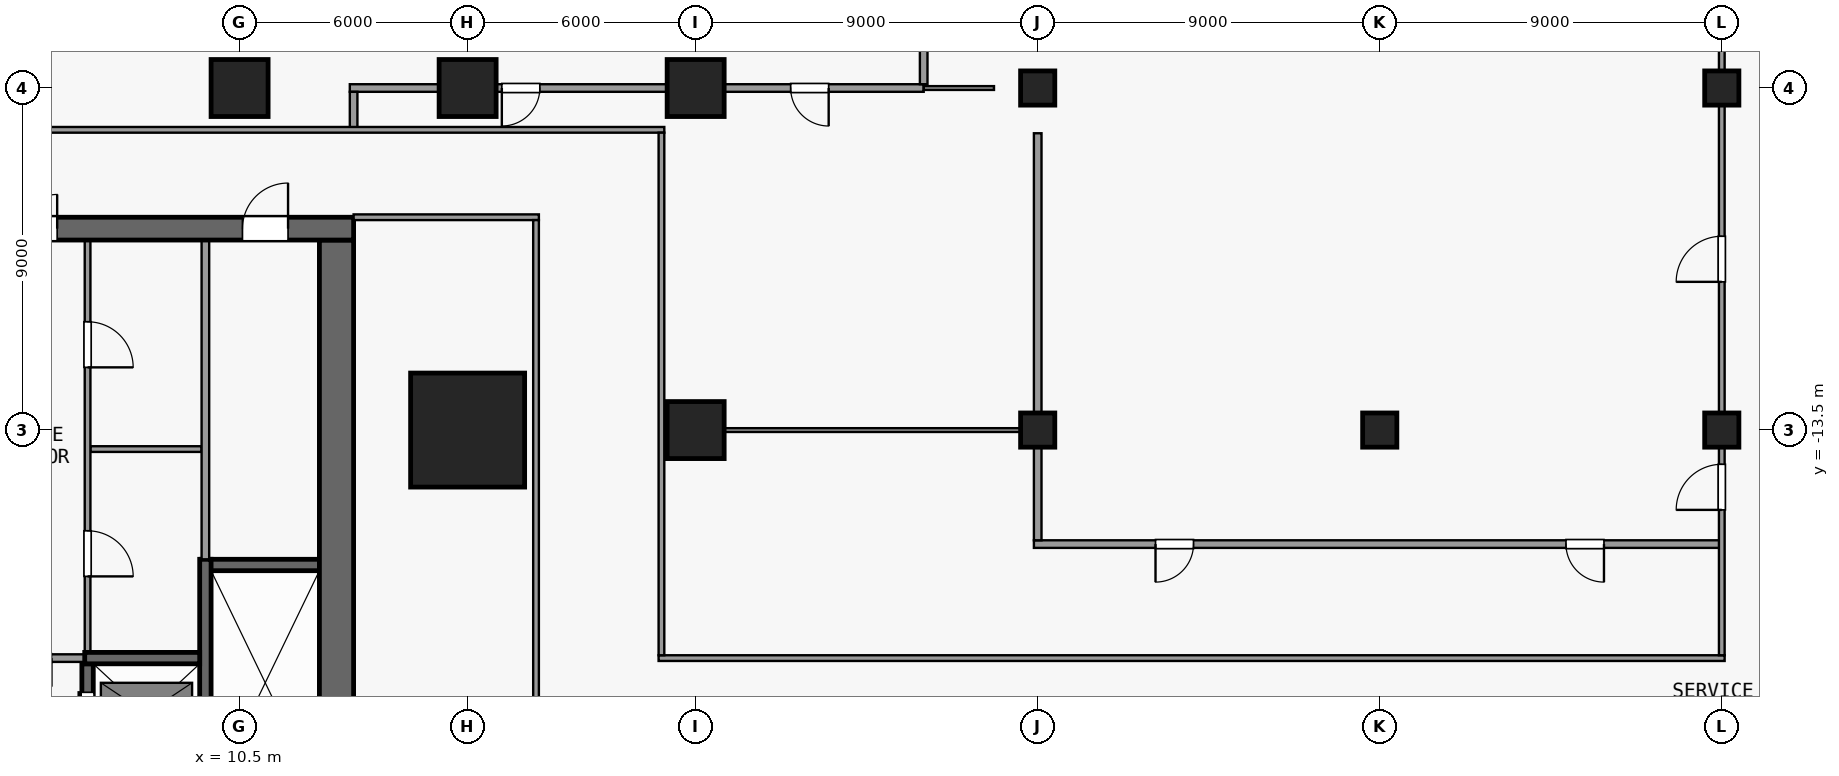
"""IFC4 building model, lengths in metres.
Left out: names, types, materials, properties, quantities, classifications, styles, units other than length and angle.
Written with IfcOpenShell. Run it as: python <this file> out.ifc"""

import sys

from ifc_helpers import new_model, si_unit, direction, frame, frame_2d, origin, origin_2d, place, context, subcontext, project, spatial, rectangle, extrude, element, fill, save


model = new_model("IFC4")
c1 = context("Model", 3, precision=1e-05, world=origin(), true_north=direction((0.0, 1.0)))
c2 = subcontext(c1, "Body", "Model", "MODEL_VIEW")
j1 = project(units=[si_unit("LENGTHUNIT", "METRE"), si_unit("PLANEANGLEUNIT", "RADIAN")], contexts=[c1])
p1 = place(None, origin())
s1 = spatial("IfcSite", under=j1, at=p1, CompositionType="ELEMENT")
p2 = place(p1, origin())
s2 = spatial("IfcBuilding", under=s1, at=p2, CompositionType="ELEMENT")
p3 = place(p2, origin())
s3 = spatial("IfcBuildingStorey", under=s2, at=p3, CompositionType="ELEMENT", Elevation=0.0)
p4 = place(p3, frame((10.5, -4.5, 0.0), z_axis=(0.0, 0.0, 1.0), x_axis=(1.0, 0.0, 0.0)))
e1 = element("IfcColumn", 1, at=p4, inside=s3, PredefinedType="COLUMN", context=c2, shape_type="SweptSolid", body=[
    extrude(rectangle(XDim=1.5, YDim=1.5, at=origin_2d()), origin(), (0.0, 0.0, 1.0), 8.0),
])
p5 = place(p3, frame((16.5, -13.5, 0.0), z_axis=(0.0, 0.0, 1.0), x_axis=(1.0, 0.0, 0.0)))
e2 = element("IfcColumn", 2, at=p5, inside=s3, PredefinedType="COLUMN", context=c2, shape_type="SweptSolid", body=[
    extrude(rectangle(XDim=3.0, YDim=3.0, at=origin_2d()), origin(), (0.0, 0.0, 1.0), 8.0),
])
for number, where, z_axis, x_axis in (
    (3, (16.5, -4.5, 0.0), (0.0, 0.0, 1.0), (1.0, 0.0, 0.0)),
    (4, (22.5, -13.5, 0.0), (0.0, 0.0, 1.0), (1.0, 0.0, 0.0)),
    (5, (22.5, -4.5, 0.0), (0.0, 0.0, 1.0), (1.0, 0.0, 0.0)),
):
    element("IfcColumn", number, at=place(p3, frame(where, z_axis=z_axis, x_axis=x_axis)), inside=s3, PredefinedType="COLUMN", context=c2, shape_type="SweptSolid", body=[
        extrude(rectangle(XDim=1.5, YDim=1.5, at=origin_2d()), origin(), (0.0, 0.0, 1.0), 8.0),
    ])
for number, where, z_axis, x_axis in (
    (6, (31.5, -13.5, 0.0), (0.0, 0.0, 1.0), (1.0, 0.0, 0.0)),
    (7, (31.5, -4.5, 0.0), (0.0, 0.0, 1.0), (1.0, 0.0, 0.0)),
    (8, (40.5, -13.5, 0.0), (0.0, 0.0, 1.0), (1.0, 0.0, 0.0)),
    (9, (49.5, -13.5, 0.0), (0.0, 0.0, 1.0), (1.0, 0.0, 0.0)),
    (10, (49.5, -4.5, 0.0), (0.0, 0.0, 1.0), (1.0, 0.0, 0.0)),
):
    element("IfcColumn", number, at=place(p3, frame(where, z_axis=z_axis, x_axis=x_axis)), inside=s3, PredefinedType="COLUMN", context=c2, shape_type="SweptSolid", body=[
        extrude(rectangle(XDim=0.9, YDim=0.9, at=origin_2d()), origin(), (0.0, 0.0, 1.0), 8.0),
    ])
p6 = place(p3, frame((-13.5, -8.2, 0.0), z_axis=(0.0, 0.0, 1.0), x_axis=(1.0, 0.0, 0.0)))
e11 = element("IfcWall", 11, at=p6, inside=s3, PredefinedType="SHEAR", context=c2, shape_type="SweptSolid", body=[
    extrude(rectangle(XDim=27.0, YDim=0.6, at=frame_2d((13.5, 0.0))), origin(), (0.0, 0.0, 1.0), 7.65),
])
p7 = place(p6, frame((7.8, 0.0, 0.0)))
e12 = element("IfcOpeningElement", 12, at=p7, cuts=e11, PredefinedType="OPENING", context=c2, shape_type="SweptSolid", body=[
    extrude(rectangle(XDim=1.8, YDim=2.1, at=frame_2d((0.9, 1.05))), frame((0.0, 0.31, 0.0), z_axis=(0.0, -1.0, 0.0), x_axis=(1.0, 0.0, 0.0)), (0.0, 0.0, 1.0), 0.62),
])
p8 = place(p6, frame((17.4, 0.0, 0.0)))
e13 = element("IfcOpeningElement", 13, at=p8, cuts=e11, PredefinedType="OPENING", context=c2, shape_type="SweptSolid", body=[
    extrude(rectangle(XDim=1.8, YDim=2.1, at=frame_2d((0.9, 1.05))), frame((0.0, 0.31, 0.0), z_axis=(0.0, -1.0, 0.0), x_axis=(1.0, 0.0, 0.0)), (0.0, 0.0, 1.0), 0.62),
])
p9 = place(p6, frame((2.725, 0.0, 0.0)))
e14 = element("IfcOpeningElement", 14, at=p9, cuts=e11, PredefinedType="OPENING", context=c2, shape_type="SweptSolid", body=[
    extrude(rectangle(XDim=0.9, YDim=2.1, at=frame_2d((0.45, 1.05))), frame((0.0, 0.31, 0.0), z_axis=(0.0, -1.0, 0.0), x_axis=(1.0, 0.0, 0.0)), (0.0, 0.0, 1.0), 0.62),
])
p10 = place(p6, frame((24.075, 0.0, 0.0)))
e15 = element("IfcOpeningElement", 15, at=p10, cuts=e11, PredefinedType="OPENING", context=c2, shape_type="SweptSolid", body=[
    extrude(rectangle(XDim=1.2, YDim=2.1, at=frame_2d((0.6, 1.05))), frame((0.0, 0.31, 0.0), z_axis=(0.0, -1.0, 0.0), x_axis=(1.0, 0.0, 0.0)), (0.0, 0.0, 1.0), 0.62),
])
p11 = place(p3, frame((13.05, -24.6, 0.0), z_axis=(0.0, 0.0, 1.0), x_axis=(0.0, 1.0, 0.0)))
e16 = element("IfcWall", 16, at=p11, inside=s3, PredefinedType="SHEAR", context=c2, shape_type="SweptSolid", body=[
    extrude(rectangle(XDim=16.1, YDim=0.9, at=frame_2d((8.05, 0.0))), origin(), (0.0, 0.0, 1.0), 7.65),
])
p12 = place(p3, frame((6.575, -19.5, 0.0), z_axis=(0.0, 0.0, 1.0), x_axis=(-1.0, 0.0, 0.0)))
e17 = element("IfcWall", 17, at=p12, inside=s3, PredefinedType="PARTITIONING", context=c2, shape_type="SweptSolid", body=[
    extrude(rectangle(XDim=3.55, YDim=0.2, at=frame_2d((1.775, 0.0))), origin(), (0.0, 0.0, 1.0), 7.65),
])
p13 = place(p12, frame((1.025, 0.0, 0.0)))
e18 = element("IfcOpeningElement", 18, at=p13, cuts=e17, PredefinedType="OPENING", context=c2, shape_type="SweptSolid", body=[
    extrude(rectangle(XDim=1.5, YDim=2.1, at=frame_2d((0.75, 1.05))), frame((0.0, 0.11, 0.0), z_axis=(0.0, -1.0, 0.0), x_axis=(1.0, 0.0, 0.0)), (0.0, 0.0, 1.0), 0.22),
])
p14 = place(p3, frame((6.425, -19.5, 0.0), z_axis=(0.0, 0.0, 1.0), x_axis=(1.0, 0.0, 0.0)))
e19 = element("IfcWall", 19, at=p14, inside=s3, PredefinedType="SHEAR", context=c2, shape_type="SweptSolid", body=[
    extrude(rectangle(XDim=3.025, YDim=0.3, at=frame_2d((1.512, 0.0))), origin(), (0.0, 0.0, 1.0), 7.65),
])
p15 = place(p3, frame((9.5, -17.05, 0.0), z_axis=(0.0, 0.0, 1.0), x_axis=(1.0, 0.0, 0.0)))
e20 = element("IfcWall", 20, at=p15, inside=s3, PredefinedType="SHEAR", context=c2, shape_type="SweptSolid", body=[
    extrude(rectangle(XDim=3.1, YDim=0.3, at=frame_2d((1.55, 0.0))), origin(), (0.0, 0.0, 1.0), 7.65),
])
p16 = place(p3, frame((6.575, -14.0, 0.0), z_axis=(0.0, 0.0, 1.0), x_axis=(1.0, 0.0, 0.0)))
e21 = element("IfcWall", 21, at=p16, inside=s3, PredefinedType="PARTITIONING", context=c2, shape_type="SweptSolid", body=[
    extrude(rectangle(XDim=2.925, YDim=0.15, at=frame_2d((1.462, 0.0))), origin(), (0.0, 0.0, 1.0), 7.65),
])
p17 = place(p3, frame((6.5, -22.25, 0.0), z_axis=(0.0, 0.0, 1.0), x_axis=(0.0, 1.0, 0.0)))
e22 = element("IfcWall", 22, at=p17, inside=s3, PredefinedType="SHEAR", context=c2, shape_type="SweptSolid", body=[
    extrude(rectangle(XDim=2.6, YDim=0.3, at=frame_2d((1.3, 0.0))), origin(), (0.0, 0.0, 1.0), 7.65),
])
p18 = place(p17, frame((0.75, 0.0, 0.0)))
e23 = element("IfcOpeningElement", 23, at=p18, cuts=e22, PredefinedType="OPENING", context=c2, shape_type="SweptSolid", body=[
    extrude(rectangle(XDim=1.1, YDim=2.1, at=frame_2d((0.55, 1.05))), frame((0.0, 0.16, 0.0), z_axis=(0.0, -1.0, 0.0), x_axis=(1.0, 0.0, 0.0)), (0.0, 0.0, 1.0), 0.32),
])
p19 = place(p3, frame((6.5, -8.5, 0.0), z_axis=(0.0, 0.0, 1.0), x_axis=(0.0, -1.0, 0.0)))
e24 = element("IfcWall", 24, at=p19, inside=s3, PredefinedType="PARTITIONING", context=c2, shape_type="SweptSolid", body=[
    extrude(rectangle(XDim=10.85, YDim=0.15, at=frame_2d((5.425, 0.0))), origin(), (0.0, 0.0, 1.0), 7.65),
])
p20 = place(p19, frame((7.65, 0.0, 0.0)))
e25 = element("IfcOpeningElement", 25, at=p20, cuts=e24, PredefinedType="OPENING", context=c2, shape_type="SweptSolid", body=[
    extrude(rectangle(XDim=1.2, YDim=2.1, at=frame_2d((0.6, 1.05))), frame((0.0, 0.085, 0.0), z_axis=(0.0, -1.0, 0.0), x_axis=(1.0, 0.0, 0.0)), (0.0, 0.0, 1.0), 0.17),
])
p21 = place(p19, frame((2.15, 0.0, 0.0)))
e26 = element("IfcOpeningElement", 26, at=p21, cuts=e24, PredefinedType="OPENING", context=c2, shape_type="SweptSolid", body=[
    extrude(rectangle(XDim=1.2, YDim=2.1, at=frame_2d((0.6, 1.05))), frame((0.0, 0.085, 0.0), z_axis=(0.0, -1.0, 0.0), x_axis=(1.0, 0.0, 0.0)), (0.0, 0.0, 1.0), 0.17),
])
p22 = place(p3, frame((9.6, -16.9, 0.0), z_axis=(0.0, 0.0, 1.0), x_axis=(0.0, -1.0, 0.0)))
e27 = element("IfcWall", 27, at=p22, inside=s3, PredefinedType="SHEAR", context=c2, shape_type="SweptSolid", body=[
    extrude(rectangle(XDim=7.7, YDim=0.3, at=frame_2d((3.85, 0.0))), origin(), (0.0, 0.0, 1.0), 7.65),
])
p23 = place(p22, frame((6.5, 0.0, 0.0)))
e28 = element("IfcOpeningElement", 28, at=p23, cuts=e27, PredefinedType="OPENING", context=c2, shape_type="SweptSolid", body=[
    extrude(rectangle(XDim=1.1, YDim=2.1, at=frame_2d((0.55, 1.05))), frame((0.0, 0.16, 0.0), z_axis=(0.0, -1.0, 0.0), x_axis=(1.0, 0.0, 0.0)), (0.0, 0.0, 1.0), 0.32),
])
p24 = place(p3, frame((9.6, -16.9, 0.0), z_axis=(0.0, 0.0, 1.0), x_axis=(0.0, 1.0, 0.0)))
e29 = element("IfcWall", 29, at=p24, inside=s3, PredefinedType="PARTITIONING", context=c2, shape_type="SweptSolid", body=[
    extrude(rectangle(XDim=8.4, YDim=0.2, at=frame_2d((4.2, 0.0))), origin(), (0.0, 0.0, 1.0), 7.65),
])
p25 = place(p3, frame((21.525, -19.5, 0.0), z_axis=(0.0, 0.0, 1.0), x_axis=(1.0, 0.0, 0.0)))
e30 = element("IfcWall", 30, at=p25, inside=s3, PredefinedType="PARTITIONING", context=c2, shape_type="SweptSolid", body=[
    extrude(rectangle(XDim=28.05, YDim=0.15, at=frame_2d((14.025, 0.0))), origin(), (0.0, 0.0, 1.0), 7.65),
])
p26 = place(p3, frame((13.5, -7.9, 0.0), z_axis=(0.0, 0.0, 1.0), x_axis=(1.0, 0.0, 0.0)))
e31 = element("IfcWall", 31, at=p26, inside=s3, PredefinedType="PARTITIONING", context=c2, shape_type="SweptSolid", body=[
    extrude(rectangle(XDim=4.875, YDim=0.15, at=frame_2d((2.438, 0.0))), origin(), (0.0, 0.0, 1.0), 7.65),
])
p27 = place(p3, frame((3.825, -5.6, 0.0), z_axis=(0.0, 0.0, 1.0), x_axis=(1.0, 0.0, 0.0)))
e32 = element("IfcWall", 32, at=p27, inside=s3, PredefinedType="PARTITIONING", context=c2, shape_type="SweptSolid", body=[
    extrude(rectangle(XDim=17.85, YDim=0.15, at=frame_2d((8.925, 0.0))), origin(), (0.0, 0.0, 1.0), 7.65),
])
p28 = place(p3, frame((18.3, -22.425, 0.0), z_axis=(0.0, 0.0, 1.0), x_axis=(0.0, 1.0, 0.0)))
e33 = element("IfcWall", 33, at=p28, inside=s3, PredefinedType="PARTITIONING", context=c2, shape_type="SweptSolid", body=[
    extrude(rectangle(XDim=14.45, YDim=0.15, at=frame_2d((7.225, 0.0))), origin(), (0.0, 0.0, 1.0), 7.65),
])
p29 = place(p3, frame((21.6, -19.425, 0.0), z_axis=(0.0, 0.0, 1.0), x_axis=(0.0, 1.0, 0.0)))
e34 = element("IfcWall", 34, at=p29, inside=s3, PredefinedType="PARTITIONING", context=c2, shape_type="SweptSolid", body=[
    extrude(rectangle(XDim=13.75, YDim=0.15, at=frame_2d((6.875, 0.0))), origin(), (0.0, 0.0, 1.0), 7.65),
])
p30 = place(p3, frame((49.5, -19.425, 0.0), z_axis=(0.0, 0.0, 1.0), x_axis=(0.0, 1.0, 0.0)))
e35 = element("IfcWall", 35, at=p30, inside=s3, PredefinedType="PARTITIONING", context=c2, shape_type="SweptSolid", body=[
    extrude(rectangle(XDim=5.475, YDim=0.15, at=frame_2d((2.738, 0.0))), origin(), (0.0, 0.0, 1.0), 7.65),
])
p31 = place(p30, frame((3.825, 0.0, 0.0)))
e36 = element("IfcOpeningElement", 36, at=p31, cuts=e35, PredefinedType="OPENING", context=c2, shape_type="SweptSolid", body=[
    extrude(rectangle(XDim=1.2, YDim=2.1, at=frame_2d((0.6, 1.05))), frame((0.0, 0.085, 0.0), z_axis=(0.0, -1.0, 0.0), x_axis=(1.0, 0.0, 0.0)), (0.0, 0.0, 1.0), 0.17),
])
p32 = place(p3, frame((49.5, -13.05, 0.0), z_axis=(0.0, 0.0, 1.0), x_axis=(0.0, 1.0, 0.0)))
e37 = element("IfcWall", 37, at=p32, inside=s3, PredefinedType="PARTITIONING", context=c2, shape_type="SweptSolid", body=[
    extrude(rectangle(XDim=8.1, YDim=0.15, at=frame_2d((4.05, 0.0))), origin(), (0.0, 0.0, 1.0), 7.65),
])
p33 = place(p32, frame((3.45, 0.0, 0.0)))
e38 = element("IfcOpeningElement", 38, at=p33, cuts=e37, PredefinedType="OPENING", context=c2, shape_type="SweptSolid", body=[
    extrude(rectangle(XDim=1.2, YDim=2.1, at=frame_2d((0.6, 1.05))), frame((0.0, 0.085, 0.0), z_axis=(0.0, -1.0, 0.0), x_axis=(1.0, 0.0, 0.0)), (0.0, 0.0, 1.0), 0.17),
])
p34 = place(p3, frame((49.5, -4.05, 0.0), z_axis=(0.0, 0.0, 1.0), x_axis=(0.0, 1.0, 0.0)))
e39 = element("IfcWall", 39, at=p34, inside=s3, PredefinedType="PARTITIONING", context=c2, shape_type="SweptSolid", body=[
    extrude(rectangle(XDim=5.1, YDim=0.15, at=frame_2d((2.55, 0.0))), origin(), (0.0, 0.0, 1.0), 7.65),
])
p35 = place(p3, frame((31.4, -16.5, 0.0), z_axis=(0.0, 0.0, 1.0), x_axis=(1.0, 0.0, 0.0)))
e40 = element("IfcWall", 40, at=p35, inside=s3, PredefinedType="PARTITIONING", context=c2, shape_type="SweptSolid", body=[
    extrude(rectangle(XDim=18.1, YDim=0.2, at=frame_2d((9.05, 0.0))), origin(), (0.0, 0.0, 1.0), 7.65),
])
p36 = place(p35, frame((3.2, 0.0, 0.0)))
e41 = element("IfcOpeningElement", 41, at=p36, cuts=e40, PredefinedType="OPENING", context=c2, shape_type="SweptSolid", body=[
    extrude(rectangle(XDim=1.0, YDim=2.1, at=frame_2d((0.5, 1.05))), frame((0.0, 0.11, 0.0), z_axis=(0.0, -1.0, 0.0), x_axis=(1.0, 0.0, 0.0)), (0.0, 0.0, 1.0), 0.22),
])
p37 = place(p35, frame((14.0, 0.0, 0.0)))
e42 = element("IfcOpeningElement", 42, at=p37, cuts=e40, PredefinedType="OPENING", context=c2, shape_type="SweptSolid", body=[
    extrude(rectangle(XDim=1.0, YDim=2.1, at=frame_2d((0.5, 1.05))), frame((0.0, 0.11, 0.0), z_axis=(0.0, -1.0, 0.0), x_axis=(1.0, 0.0, 0.0)), (0.0, 0.0, 1.0), 0.22),
])
p38 = place(p3, frame((21.6, -13.5, 0.0), z_axis=(0.0, 0.0, 1.0), x_axis=(1.0, 0.0, 0.0)))
e43 = element("IfcWall", 43, at=p38, inside=s3, PredefinedType="PARTITIONING", context=c2, shape_type="SweptSolid", body=[
    extrude(rectangle(XDim=9.8, YDim=0.1, at=frame_2d((4.9, 0.0))), origin(), (0.0, 0.0, 1.0), 7.65),
])
p39 = place(p3, frame((13.4, -4.5, 0.0), z_axis=(0.0, 0.0, 1.0), x_axis=(1.0, 0.0, 0.0)))
e44 = element("IfcWall", 44, at=p39, inside=s3, PredefinedType="PARTITIONING", context=c2, shape_type="SweptSolid", body=[
    extrude(rectangle(XDim=15.1, YDim=0.2, at=frame_2d((7.55, 0.0))), origin(), (0.0, 0.0, 1.0), 7.65),
])
p40 = place(p39, frame((4.0, 0.0, 0.0)))
e45 = element("IfcOpeningElement", 45, at=p40, cuts=e44, PredefinedType="OPENING", context=c2, shape_type="SweptSolid", body=[
    extrude(rectangle(XDim=1.0, YDim=2.1, at=frame_2d((0.5, 1.05))), frame((0.0, 0.11, 0.0), z_axis=(0.0, -1.0, 0.0), x_axis=(1.0, 0.0, 0.0)), (0.0, 0.0, 1.0), 0.22),
])
p41 = place(p39, frame((11.6, 0.0, 0.0)))
e46 = element("IfcOpeningElement", 46, at=p41, cuts=e44, PredefinedType="OPENING", context=c2, shape_type="SweptSolid", body=[
    extrude(rectangle(XDim=1.0, YDim=2.1, at=frame_2d((0.5, 1.05))), frame((0.0, 0.11, 0.0), z_axis=(0.0, -1.0, 0.0), x_axis=(1.0, 0.0, 0.0)), (0.0, 0.0, 1.0), 0.22),
])
p42 = place(p3, frame((28.5, -4.5, 0.0), z_axis=(0.0, 0.0, 1.0), x_axis=(1.0, 0.0, 0.0)))
e47 = element("IfcWall", 47, at=p42, inside=s3, PredefinedType="PARTITIONING", context=c2, shape_type="SweptSolid", body=[
    extrude(rectangle(XDim=1.85, YDim=0.1, at=frame_2d((0.925, 0.0))), origin(), (0.0, 0.0, 1.0), 7.65),
])
p43 = place(p3, frame((13.5, -5.6, 0.0), z_axis=(0.0, 0.0, 1.0), x_axis=(0.0, 1.0, 0.0)))
e48 = element("IfcWall", 48, at=p43, inside=s3, PredefinedType="PARTITIONING", context=c2, shape_type="SweptSolid", body=[
    extrude(rectangle(XDim=1.0, YDim=0.2, at=frame_2d((0.5, 0.0))), origin(), (0.0, 0.0, 1.0), 7.65),
])
p44 = place(p3, frame((28.5, -4.4, 0.0), z_axis=(0.0, 0.0, 1.0), x_axis=(0.0, 1.0, 0.0)))
e49 = element("IfcWall", 49, at=p44, inside=s3, PredefinedType="PARTITIONING", context=c2, shape_type="SweptSolid", body=[
    extrude(rectangle(XDim=5.8, YDim=0.2, at=frame_2d((2.9, 0.0))), origin(), (0.0, 0.0, 1.0), 7.65),
])
p45 = place(p44, frame((2.4, 0.0, 0.0)))
e50 = element("IfcOpeningElement", 50, at=p45, cuts=e49, PredefinedType="OPENING", context=c2, shape_type="SweptSolid", body=[
    extrude(rectangle(XDim=1.0, YDim=2.1, at=frame_2d((0.5, 1.05))), frame((0.0, 0.11, 0.0), z_axis=(0.0, -1.0, 0.0), x_axis=(1.0, 0.0, 0.0)), (0.0, 0.0, 1.0), 0.22),
])
p46 = place(p3, frame((31.5, -16.4, 0.0), z_axis=(0.0, 0.0, 1.0), x_axis=(0.0, 1.0, 0.0)))
e51 = element("IfcWall", 51, at=p46, inside=s3, PredefinedType="PARTITIONING", context=c2, shape_type="SweptSolid", body=[
    extrude(rectangle(XDim=10.71, YDim=0.2, at=frame_2d((5.355, 0.0))), origin(), (0.0, 0.0, 1.0), 7.65),
])
p47 = place(p18, origin())
e52 = element("IfcDoor", 52, at=p47, inside=s3, OperationType="DOUBLE_DOOR_SLIDING", PredefinedType="DOOR", context=c2, shape_type="SweptSolid", body=[
    extrude(rectangle(XDim=1.1, YDim=2.1, at=frame_2d((0.55, 1.05))), frame((0.0, 0.025, 0.0), z_axis=(0.0, -1.0, 0.0), x_axis=(1.0, 0.0, 0.0)), (0.0, 0.0, 1.0), 0.05),
])
fill(e23, e52)
p48 = place(p8, origin())
e53 = element("IfcDoor", 53, at=p48, inside=s3, OperationType="DOUBLE_DOOR_SINGLE_SWING", PredefinedType="DOOR", context=c2, shape_type="SweptSolid", body=[
    extrude(rectangle(XDim=1.8, YDim=2.1, at=frame_2d((0.9, 1.05))), frame((0.0, 0.025, 0.0), z_axis=(0.0, -1.0, 0.0), x_axis=(1.0, 0.0, 0.0)), (0.0, 0.0, 1.0), 0.05),
])
fill(e13, e53)
p49 = place(p10, origin())
e54 = element("IfcDoor", 54, at=p49, inside=s3, OperationType="SINGLE_SWING_RIGHT", PredefinedType="DOOR", context=c2, shape_type="SweptSolid", body=[
    extrude(rectangle(XDim=1.2, YDim=2.1, at=frame_2d((0.6, 1.05))), frame((0.0, 0.025, 0.0), z_axis=(0.0, -1.0, 0.0), x_axis=(1.0, 0.0, 0.0)), (0.0, 0.0, 1.0), 0.05),
])
fill(e15, e54)
p50 = place(p20, origin())
e55 = element("IfcDoor", 55, at=p50, inside=s3, OperationType="SINGLE_SWING_RIGHT", PredefinedType="DOOR", context=c2, shape_type="SweptSolid", body=[
    extrude(rectangle(XDim=1.2, YDim=2.1, at=frame_2d((0.6, 1.05))), frame((0.0, 0.025, 0.0), z_axis=(0.0, -1.0, 0.0), x_axis=(1.0, 0.0, 0.0)), (0.0, 0.0, 1.0), 0.05),
])
fill(e25, e55)
p51 = place(p21, origin())
e56 = element("IfcDoor", 56, at=p51, inside=s3, OperationType="SINGLE_SWING_RIGHT", PredefinedType="DOOR", context=c2, shape_type="SweptSolid", body=[
    extrude(rectangle(XDim=1.2, YDim=2.1, at=frame_2d((0.6, 1.05))), frame((0.0, 0.025, 0.0), z_axis=(0.0, -1.0, 0.0), x_axis=(1.0, 0.0, 0.0)), (0.0, 0.0, 1.0), 0.05),
])
fill(e26, e56)
p52 = place(p31, origin())
e57 = element("IfcDoor", 57, at=p52, inside=s3, OperationType="SINGLE_SWING_LEFT", PredefinedType="DOOR", context=c2, shape_type="SweptSolid", body=[
    extrude(rectangle(XDim=1.2, YDim=2.1, at=frame_2d((0.6, 1.05))), frame((0.0, 0.025, 0.0), z_axis=(0.0, -1.0, 0.0), x_axis=(1.0, 0.0, 0.0)), (0.0, 0.0, 1.0), 0.05),
])
fill(e36, e57)
p53 = place(p33, origin())
e58 = element("IfcDoor", 58, at=p53, inside=s3, OperationType="SINGLE_SWING_LEFT", PredefinedType="DOOR", context=c2, shape_type="SweptSolid", body=[
    extrude(rectangle(XDim=1.2, YDim=2.1, at=frame_2d((0.6, 1.05))), frame((0.0, 0.025, 0.0), z_axis=(0.0, -1.0, 0.0), x_axis=(1.0, 0.0, 0.0)), (0.0, 0.0, 1.0), 0.05),
])
fill(e38, e58)
p54 = place(p36, origin())
e59 = element("IfcDoor", 59, at=p54, inside=s3, OperationType="SINGLE_SWING_LEFT", PredefinedType="DOOR", context=c2, shape_type="SweptSolid", body=[
    extrude(rectangle(XDim=1.0, YDim=2.1, at=frame_2d((0.5, 1.05))), frame((0.0, 0.025, 0.0), z_axis=(0.0, -1.0, 0.0), x_axis=(1.0, 0.0, 0.0)), (0.0, 0.0, 1.0), 0.05),
])
fill(e41, e59)
p55 = place(p37, origin())
e60 = element("IfcDoor", 60, at=p55, inside=s3, OperationType="SINGLE_SWING_RIGHT", PredefinedType="DOOR", context=c2, shape_type="SweptSolid", body=[
    extrude(rectangle(XDim=1.0, YDim=2.1, at=frame_2d((0.5, 1.05))), frame((0.0, 0.025, 0.0), z_axis=(0.0, -1.0, 0.0), x_axis=(1.0, 0.0, 0.0)), (0.0, 0.0, 1.0), 0.05),
])
fill(e42, e60)
p56 = place(p40, origin())
e61 = element("IfcDoor", 61, at=p56, inside=s3, OperationType="SINGLE_SWING_LEFT", PredefinedType="DOOR", context=c2, shape_type="SweptSolid", body=[
    extrude(rectangle(XDim=1.0, YDim=2.1, at=frame_2d((0.5, 1.05))), frame((0.0, 0.025, 0.0), z_axis=(0.0, -1.0, 0.0), x_axis=(1.0, 0.0, 0.0)), (0.0, 0.0, 1.0), 0.05),
])
fill(e45, e61)
p57 = place(p41, origin())
e62 = element("IfcDoor", 62, at=p57, inside=s3, OperationType="SINGLE_SWING_RIGHT", PredefinedType="DOOR", context=c2, shape_type="SweptSolid", body=[
    extrude(rectangle(XDim=1.0, YDim=2.1, at=frame_2d((0.5, 1.05))), frame((0.0, 0.025, 0.0), z_axis=(0.0, -1.0, 0.0), x_axis=(1.0, 0.0, 0.0)), (0.0, 0.0, 1.0), 0.05),
])
fill(e46, e62)
save(model, sys.argv[1])
